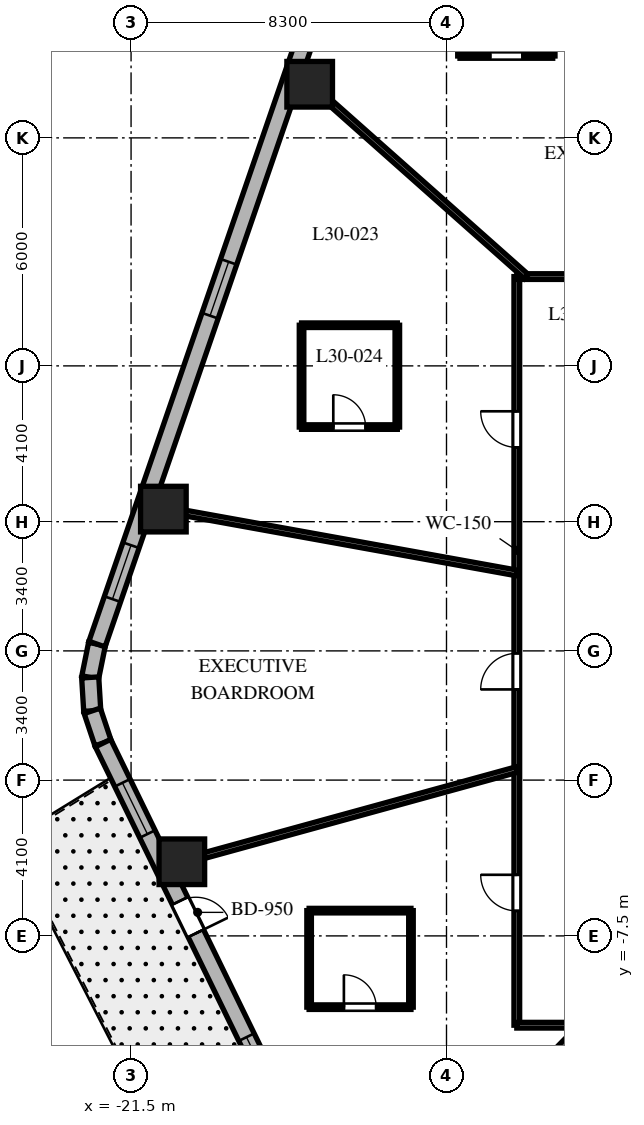
"""IFC4 building model, lengths in metres.
Left out: names, types, materials, properties, quantities, classifications, styles, units other than length and angle.
Written with IfcOpenShell. Run it as: python <this file> out.ifc"""

import sys

from ifc_helpers import new_model, si_unit, direction, frame, frame_2d, origin, origin_2d, place, context, subcontext, project, spatial, rectangle, extrude, element, fill, save


model = new_model("IFC4")
c1 = context("Model", 3, precision=1e-05, world=origin(), true_north=direction((0.0, 1.0)))
c2 = subcontext(c1, "Body", "Model", "MODEL_VIEW")
j1 = project(units=[si_unit("LENGTHUNIT", "METRE"), si_unit("PLANEANGLEUNIT", "RADIAN")], contexts=[c1])
p1 = place(None, origin())
s1 = spatial("IfcSite", under=j1, at=p1, CompositionType="ELEMENT")
p2 = place(p1, origin())
s2 = spatial("IfcBuilding", under=s1, at=p2, CompositionType="ELEMENT")
p3 = place(p2, frame((0.0, 0.0, 124.7)))
s3 = spatial("IfcBuildingStorey", under=s2, at=p3, CompositionType="ELEMENT", Elevation=124.7)
for number, where, z_axis, x_axis in (
    (1, (-16.8, 14.911, 0.0), (0.0, 0.0, 1.0), (1.0, 0.0, 0.0)),
    (2, (-20.65, 3.731, 0.0), (0.0, 0.0, 1.0), (1.0, 0.0, 0.0)),
    (3, (-20.164, -5.549, 0.0), (0.0, 0.0, 1.0), (1.0, 0.0, 0.0)),
):
    element("IfcColumn", number, at=place(p3, frame(where, z_axis=z_axis, x_axis=x_axis)), inside=s3, PredefinedType="COLUMN", context=c2, shape_type="SweptSolid", body=[
        extrude(rectangle(XDim=1.2, YDim=1.2, at=origin_2d()), origin(), (0.0, 0.0, 1.0), 3.7),
    ])
p4 = place(p3, frame((-22.397, 0.179, 0.0), z_axis=(0.0, 0.0, 1.0), x_axis=(-0.199313589404, -0.979935759669, 0.0)))
e4 = element("IfcWall", 4, at=p4, inside=s3, PredefinedType="SOLIDWALL", context=c2, shape_type="SweptSolid", body=[
    extrude(rectangle(XDim=0.896, YDim=0.45, at=frame_2d((0.448, 0.0))), origin(), (0.0, 0.0, 1.0), 3.4),
])
p5 = place(p3, frame((-22.575, -0.698, 0.0), z_axis=(0.0, 0.0, 1.0), x_axis=(0.060980441946, -0.998138961117, 0.0)))
e5 = element("IfcWall", 5, at=p5, inside=s3, PredefinedType="SOLIDWALL", context=c2, shape_type="SweptSolid", body=[
    extrude(rectangle(XDim=0.881, YDim=0.45, at=frame_2d((0.44, 0.0))), origin(), (0.0, 0.0, 1.0), 3.4),
])
p6 = place(p3, frame((-22.522, -1.577, 0.0), z_axis=(0.0, 0.0, 1.0), x_axis=(0.317372694837, -0.948300887151, 0.0)))
e6 = element("IfcWall", 6, at=p6, inside=s3, PredefinedType="SOLIDWALL", context=c2, shape_type="SweptSolid", body=[
    extrude(rectangle(XDim=0.896, YDim=0.45, at=frame_2d((0.448, 0.0))), origin(), (0.0, 0.0, 1.0), 3.4),
])
p7 = place(p3, frame((-15.992, 18.777, 0.0), z_axis=(0.0, 0.0, 1.0), x_axis=(-0.325606988926, -0.945505202927, 0.0)))
e7 = element("IfcWall", 7, at=p7, inside=s3, PredefinedType="SOLIDWALL", context=c2, shape_type="SweptSolid", body=[
    extrude(rectangle(XDim=19.669, YDim=0.45, at=frame_2d((9.835, 0.0))), origin(), (0.0, 0.0, 1.0), 3.4),
])
p8 = place(p7, frame((1.197, 0.0, 0.8)))
e8 = element("IfcOpeningElement", 8, at=p8, cuts=e7, PredefinedType="OPENING", context=c2, shape_type="SweptSolid", body=[
    extrude(rectangle(XDim=1.5, YDim=1.8, at=frame_2d((0.75, 0.9))), frame((0.0, 0.235, 0.0), z_axis=(0.0, -1.0, 0.0), x_axis=(1.0, 0.0, 0.0)), (0.0, 0.0, 1.0), 0.47),
])
p9 = place(p7, frame((9.03, 0.0, 0.8)))
e9 = element("IfcOpeningElement", 9, at=p9, cuts=e7, PredefinedType="OPENING", context=c2, shape_type="SweptSolid", body=[
    extrude(rectangle(XDim=1.5, YDim=1.8, at=frame_2d((0.75, 0.9))), frame((0.0, 0.235, 0.0), z_axis=(0.0, -1.0, 0.0), x_axis=(1.0, 0.0, 0.0)), (0.0, 0.0, 1.0), 0.47),
])
p10 = place(p7, frame((16.918, 0.0, 0.8)))
e10 = element("IfcOpeningElement", 10, at=p10, cuts=e7, PredefinedType="OPENING", context=c2, shape_type="SweptSolid", body=[
    extrude(rectangle(XDim=1.5, YDim=1.8, at=frame_2d((0.75, 0.9))), frame((0.0, 0.235, 0.0), z_axis=(0.0, -1.0, 0.0), x_axis=(1.0, 0.0, 0.0)), (0.0, 0.0, 1.0), 0.47),
])
p11 = place(p3, frame((-22.238, -2.427, 0.0), z_axis=(0.0, 0.0, 1.0), x_axis=(0.438374803278, -0.898792262901, 0.0)))
e11 = element("IfcWall", 11, at=p11, inside=s3, PredefinedType="SOLIDWALL", context=c2, shape_type="SweptSolid", body=[
    extrude(rectangle(XDim=18.618, YDim=0.45, at=frame_2d((9.309, 0.0))), origin(), (0.0, 0.0, 1.0), 3.4),
])
p12 = place(p11, frame((4.62, 0.0, 0.0)))
e12 = element("IfcOpeningElement", 12, at=p12, cuts=e11, PredefinedType="OPENING", context=c2, shape_type="SweptSolid", body=[
    extrude(rectangle(XDim=0.95, YDim=2.15, at=frame_2d((0.475, 1.075))), frame((0.0, 0.235, 0.0), z_axis=(0.0, -1.0, 0.0), x_axis=(1.0, 0.0, 0.0)), (0.0, 0.0, 1.0), 0.47),
])
p13 = place(p11, frame((1.163, 0.0, 0.8)))
e13 = element("IfcOpeningElement", 13, at=p13, cuts=e11, PredefinedType="OPENING", context=c2, shape_type="SweptSolid", body=[
    extrude(rectangle(XDim=1.5, YDim=1.8, at=frame_2d((0.75, 0.9))), frame((0.0, 0.235, 0.0), z_axis=(0.0, -1.0, 0.0), x_axis=(1.0, 0.0, 0.0)), (0.0, 0.0, 1.0), 0.47),
])
p14 = place(p11, frame((8.61, 0.0, 0.8)))
e14 = element("IfcOpeningElement", 14, at=p14, cuts=e11, PredefinedType="OPENING", context=c2, shape_type="SweptSolid", body=[
    extrude(rectangle(XDim=1.5, YDim=1.8, at=frame_2d((0.75, 0.9))), frame((0.0, 0.235, 0.0), z_axis=(0.0, -1.0, 0.0), x_axis=(1.0, 0.0, 0.0)), (0.0, 0.0, 1.0), 0.47),
])
p15 = place(p11, frame((16.006, 0.0, 0.8)))
e15 = element("IfcOpeningElement", 15, at=p15, cuts=e11, PredefinedType="OPENING", context=c2, shape_type="SweptSolid", body=[
    extrude(rectangle(XDim=1.5, YDim=1.8, at=frame_2d((0.75, 0.9))), frame((0.0, 0.235, 0.0), z_axis=(0.0, -1.0, 0.0), x_axis=(1.0, 0.0, 0.0)), (0.0, 0.0, 1.0), 0.47),
])
p16 = place(p3, frame((-11.35, -9.85, 0.0), z_axis=(0.0, 0.0, 1.0), x_axis=(0.0, 1.0, 0.0)))
e16 = element("IfcWall", 16, at=p16, inside=s3, PredefinedType="PARTITIONING", context=c2, shape_type="SweptSolid", body=[
    extrude(rectangle(XDim=19.7, YDim=0.15, at=frame_2d((9.85, 0.0))), origin(), (0.0, 0.0, 1.0), 2.84),
])
p17 = place(p16, frame((15.205, 0.0, 0.0)))
e17 = element("IfcOpeningElement", 17, at=p17, cuts=e16, PredefinedType="OPENING", context=c2, shape_type="SweptSolid", body=[
    extrude(rectangle(XDim=0.95, YDim=2.03, at=frame_2d((0.475, 1.015))), frame((0.0, 0.085, 0.0), z_axis=(0.0, -1.0, 0.0), x_axis=(1.0, 0.0, 0.0)), (0.0, 0.0, 1.0), 0.17),
])
p18 = place(p16, frame((8.836, 0.0, 0.0)))
e18 = element("IfcOpeningElement", 18, at=p18, cuts=e16, PredefinedType="OPENING", context=c2, shape_type="SweptSolid", body=[
    extrude(rectangle(XDim=0.95, YDim=2.03, at=frame_2d((0.475, 1.015))), frame((0.0, 0.085, 0.0), z_axis=(0.0, -1.0, 0.0), x_axis=(1.0, 0.0, 0.0)), (0.0, 0.0, 1.0), 0.17),
])
p19 = place(p16, frame((3.008, 0.0, 0.0)))
e19 = element("IfcOpeningElement", 19, at=p19, cuts=e16, PredefinedType="OPENING", context=c2, shape_type="SweptSolid", body=[
    extrude(rectangle(XDim=0.95, YDim=2.03, at=frame_2d((0.475, 1.015))), frame((0.0, 0.085, 0.0), z_axis=(0.0, -1.0, 0.0), x_axis=(1.0, 0.0, 0.0)), (0.0, 0.0, 1.0), 0.17),
])
p20 = place(p3, frame((-11.35, 9.85, 0.0), z_axis=(0.0, 0.0, 1.0), x_axis=(1.0, 0.0, 0.0)))
e20 = element("IfcWall", 20, at=p20, inside=s3, PredefinedType="PARTITIONING", context=c2, shape_type="SweptSolid", body=[
    extrude(rectangle(XDim=22.7, YDim=0.15, at=frame_2d((11.35, 0.0))), origin(), (0.0, 0.0, 1.0), 2.84),
])
p21 = place(p20, frame((17.237, 0.0, 0.0)))
e21 = element("IfcOpeningElement", 21, at=p21, cuts=e20, PredefinedType="OPENING", context=c2, shape_type="SweptSolid", body=[
    extrude(rectangle(XDim=0.95, YDim=2.03, at=frame_2d((0.475, 1.015))), frame((0.0, 0.085, 0.0), z_axis=(0.0, -1.0, 0.0), x_axis=(1.0, 0.0, 0.0)), (0.0, 0.0, 1.0), 0.17),
])
p22 = place(p20, frame((11.994, 0.0, 0.0)))
e22 = element("IfcOpeningElement", 22, at=p22, cuts=e20, PredefinedType="OPENING", context=c2, shape_type="SweptSolid", body=[
    extrude(rectangle(XDim=0.95, YDim=2.03, at=frame_2d((0.475, 1.015))), frame((0.0, 0.085, 0.0), z_axis=(0.0, -1.0, 0.0), x_axis=(1.0, 0.0, 0.0)), (0.0, 0.0, 1.0), 0.17),
])
p23 = place(p20, frame((8.559, 0.0, 0.0)))
e23 = element("IfcOpeningElement", 23, at=p23, cuts=e20, PredefinedType="OPENING", context=c2, shape_type="SweptSolid", body=[
    extrude(rectangle(XDim=0.95, YDim=2.03, at=frame_2d((0.475, 1.015))), frame((0.0, 0.085, 0.0), z_axis=(0.0, -1.0, 0.0), x_axis=(1.0, 0.0, 0.0)), (0.0, 0.0, 1.0), 0.17),
])
p24 = place(p20, frame((3.399, 0.0, 0.0)))
e24 = element("IfcOpeningElement", 24, at=p24, cuts=e20, PredefinedType="OPENING", context=c2, shape_type="SweptSolid", body=[
    extrude(rectangle(XDim=0.95, YDim=2.03, at=frame_2d((0.475, 1.015))), frame((0.0, 0.085, 0.0), z_axis=(0.0, -1.0, 0.0), x_axis=(1.0, 0.0, 0.0)), (0.0, 0.0, 1.0), 0.17),
])
p25 = place(p3, frame((11.35, -9.85, 0.0), z_axis=(0.0, 0.0, 1.0), x_axis=(-1.0, 0.0, 0.0)))
e25 = element("IfcWall", 25, at=p25, inside=s3, PredefinedType="PARTITIONING", context=c2, shape_type="SweptSolid", body=[
    extrude(rectangle(XDim=22.7, YDim=0.15, at=frame_2d((11.35, 0.0))), origin(), (0.0, 0.0, 1.0), 2.84),
])
p26 = place(p25, frame((17.237, 0.0, 0.0)))
e26 = element("IfcOpeningElement", 26, at=p26, cuts=e25, PredefinedType="OPENING", context=c2, shape_type="SweptSolid", body=[
    extrude(rectangle(XDim=0.95, YDim=2.03, at=frame_2d((0.475, 1.015))), frame((0.0, 0.085, 0.0), z_axis=(0.0, -1.0, 0.0), x_axis=(1.0, 0.0, 0.0)), (0.0, 0.0, 1.0), 0.17),
])
p27 = place(p25, frame((10.45, 0.0, 0.0)))
e27 = element("IfcOpeningElement", 27, at=p27, cuts=e25, PredefinedType="OPENING", context=c2, shape_type="SweptSolid", body=[
    extrude(rectangle(XDim=0.95, YDim=2.03, at=frame_2d((0.475, 1.015))), frame((0.0, 0.085, 0.0), z_axis=(0.0, -1.0, 0.0), x_axis=(1.0, 0.0, 0.0)), (0.0, 0.0, 1.0), 0.17),
])
p28 = place(p25, frame((3.399, 0.0, 0.0)))
e28 = element("IfcOpeningElement", 28, at=p28, cuts=e25, PredefinedType="OPENING", context=c2, shape_type="SweptSolid", body=[
    extrude(rectangle(XDim=0.95, YDim=2.03, at=frame_2d((0.475, 1.015))), frame((0.0, 0.085, 0.0), z_axis=(0.0, -1.0, 0.0), x_axis=(1.0, 0.0, 0.0)), (0.0, 0.0, 1.0), 0.17),
])
p29 = place(p3, frame((-11.098, 9.85, 0.0), z_axis=(0.0, 0.0, 1.0), x_axis=(-0.747904295103, 0.663806572253, 0.0)))
e29 = element("IfcWall", 29, at=p29, inside=s3, PredefinedType="PARTITIONING", context=c2, shape_type="SweptSolid", body=[
    extrude(rectangle(XDim=8.16, YDim=0.15, at=frame_2d((4.08, 0.0))), origin(), (0.0, 0.0, 1.0), 2.54),
])
p30 = place(p3, frame((-11.35, 2.051, 0.0), z_axis=(0.0, 0.0, 1.0), x_axis=(-0.984068313063, 0.177790762484, 0.0)))
e30 = element("IfcWall", 30, at=p30, inside=s3, PredefinedType="PARTITIONING", context=c2, shape_type="SweptSolid", body=[
    extrude(rectangle(XDim=9.951, YDim=0.15, at=frame_2d((4.976, 0.0))), origin(), (0.0, 0.0, 1.0), 2.54),
])
p31 = place(p3, frame((-11.35, -3.123, 0.0), z_axis=(0.0, 0.0, 1.0), x_axis=(-0.964151983214, -0.265350623261, 0.0)))
e31 = element("IfcWall", 31, at=p31, inside=s3, PredefinedType="PARTITIONING", context=c2, shape_type="SweptSolid", body=[
    extrude(rectangle(XDim=9.645, YDim=0.15, at=frame_2d((4.823, 0.0))), origin(), (0.0, 0.0, 1.0), 2.54),
])
p32 = place(p3, frame((-9.628, -9.85, 0.0), z_axis=(0.0, 0.0, 1.0), x_axis=(-0.698992824326, -0.715128681805, 0.0)))
e32 = element("IfcWall", 32, at=p32, inside=s3, PredefinedType="PARTITIONING", context=c2, shape_type="SweptSolid", body=[
    extrude(rectangle(XDim=8.579, YDim=0.15, at=frame_2d((4.29, 0.0))), origin(), (0.0, 0.0, 1.0), 2.54),
])
p33 = place(p3, frame((-12.845, 15.655, 0.0), z_axis=(0.0, 0.0, 1.0), x_axis=(1.0, 0.0, 0.0)))
e33 = element("IfcWall", 33, at=p33, inside=s3, PredefinedType="PARTITIONING", context=c2, shape_type="SweptSolid", body=[
    extrude(rectangle(XDim=2.44, YDim=0.12, at=frame_2d((1.22, 0.0))), origin(), (0.0, 0.0, 1.0), 3.4),
])
p34 = place(p33, frame((0.795, 0.0, 0.0)))
e34 = element("IfcOpeningElement", 34, at=p34, cuts=e33, PredefinedType="OPENING", context=c2, shape_type="SweptSolid", body=[
    extrude(rectangle(XDim=0.85, YDim=2.03, at=frame_2d((0.425, 1.015))), frame((0.0, 0.07, 0.0), z_axis=(0.0, -1.0, 0.0), x_axis=(1.0, 0.0, 0.0)), (0.0, 0.0, 1.0), 0.14),
])
p35 = place(p3, frame((-10.405, 15.655, 0.0), z_axis=(0.0, 0.0, 1.0), x_axis=(0.0, 1.0, 0.0)))
e35 = element("IfcWall", 35, at=p35, inside=s3, PredefinedType="PARTITIONING", context=c2, shape_type="SweptSolid", body=[
    extrude(rectangle(XDim=2.61, YDim=0.12, at=frame_2d((1.305, 0.0))), origin(), (0.0, 0.0, 1.0), 3.4),
])
p36 = place(p3, frame((-12.845, 18.265, 0.0), z_axis=(0.0, 0.0, 1.0), x_axis=(0.0, -1.0, 0.0)))
e36 = element("IfcWall", 36, at=p36, inside=s3, PredefinedType="PARTITIONING", context=c2, shape_type="SweptSolid", body=[
    extrude(rectangle(XDim=2.61, YDim=0.12, at=frame_2d((1.305, 0.0))), origin(), (0.0, 0.0, 1.0), 2.54),
])
p37 = place(p3, frame((-17.014, 5.89, 0.0), z_axis=(0.0, 0.0, 1.0), x_axis=(1.0, 0.0, 0.0)))
e37 = element("IfcWall", 37, at=p37, inside=s3, PredefinedType="PARTITIONING", context=c2, shape_type="SweptSolid", body=[
    extrude(rectangle(XDim=2.52, YDim=0.12, at=frame_2d((1.26, 0.0))), origin(), (0.0, 0.0, 1.0), 2.84),
])
p38 = place(p37, frame((0.835, 0.0, 0.0)))
e38 = element("IfcOpeningElement", 38, at=p38, cuts=e37, PredefinedType="OPENING", context=c2, shape_type="SweptSolid", body=[
    extrude(rectangle(XDim=0.85, YDim=2.03, at=frame_2d((0.425, 1.015))), frame((0.0, 0.07, 0.0), z_axis=(0.0, -1.0, 0.0), x_axis=(1.0, 0.0, 0.0)), (0.0, 0.0, 1.0), 0.14),
])
p39 = place(p3, frame((-14.494, 5.89, 0.0), z_axis=(0.0, 0.0, 1.0), x_axis=(0.0, 1.0, 0.0)))
e39 = element("IfcWall", 39, at=p39, inside=s3, PredefinedType="PARTITIONING", context=c2, shape_type="SweptSolid", body=[
    extrude(rectangle(XDim=2.68, YDim=0.12, at=frame_2d((1.34, 0.0))), origin(), (0.0, 0.0, 1.0), 3.4),
])
p40 = place(p3, frame((-14.494, 8.57, 0.0), z_axis=(0.0, 0.0, 1.0), x_axis=(-1.0, 0.0, 0.0)))
e40 = element("IfcWall", 40, at=p40, inside=s3, PredefinedType="PARTITIONING", context=c2, shape_type="SweptSolid", body=[
    extrude(rectangle(XDim=2.52, YDim=0.12, at=frame_2d((1.26, 0.0))), origin(), (0.0, 0.0, 1.0), 2.972),
])
p41 = place(p3, frame((-17.014, 8.57, 0.0), z_axis=(0.0, 0.0, 1.0), x_axis=(0.0, -1.0, 0.0)))
e41 = element("IfcWall", 41, at=p41, inside=s3, PredefinedType="PARTITIONING", context=c2, shape_type="SweptSolid", body=[
    extrude(rectangle(XDim=2.68, YDim=0.12, at=frame_2d((1.34, 0.0))), origin(), (0.0, 0.0, 1.0), 3.4),
])
p42 = place(p3, frame((-16.815, -9.375, 0.0), z_axis=(0.0, 0.0, 1.0), x_axis=(1.0, 0.0, 0.0)))
e42 = element("IfcWall", 42, at=p42, inside=s3, PredefinedType="PARTITIONING", context=c2, shape_type="SweptSolid", body=[
    extrude(rectangle(XDim=2.68, YDim=0.12, at=frame_2d((1.34, 0.0))), origin(), (0.0, 0.0, 1.0), 2.927),
])
p43 = place(p42, frame((0.915, 0.0, 0.0)))
e43 = element("IfcOpeningElement", 43, at=p43, cuts=e42, PredefinedType="OPENING", context=c2, shape_type="SweptSolid", body=[
    extrude(rectangle(XDim=0.85, YDim=2.03, at=frame_2d((0.425, 1.015))), frame((0.0, 0.07, 0.0), z_axis=(0.0, -1.0, 0.0), x_axis=(1.0, 0.0, 0.0)), (0.0, 0.0, 1.0), 0.14),
])
p44 = place(p3, frame((-14.135, -9.375, 0.0), z_axis=(0.0, 0.0, 1.0), x_axis=(0.0, 1.0, 0.0)))
e44 = element("IfcWall", 44, at=p44, inside=s3, PredefinedType="PARTITIONING", context=c2, shape_type="SweptSolid", body=[
    extrude(rectangle(XDim=2.54, YDim=0.12, at=frame_2d((1.27, 0.0))), origin(), (0.0, 0.0, 1.0), 3.4),
])
p45 = place(p3, frame((-14.135, -6.835, 0.0), z_axis=(0.0, 0.0, 1.0), x_axis=(-1.0, 0.0, 0.0)))
e45 = element("IfcWall", 45, at=p45, inside=s3, PredefinedType="PARTITIONING", context=c2, shape_type="SweptSolid", body=[
    extrude(rectangle(XDim=2.68, YDim=0.12, at=frame_2d((1.34, 0.0))), origin(), (0.0, 0.0, 1.0), 2.927),
])
p46 = place(p3, frame((-16.815, -6.835, 0.0), z_axis=(0.0, 0.0, 1.0), x_axis=(0.0, -1.0, 0.0)))
e46 = element("IfcWall", 46, at=p46, inside=s3, PredefinedType="PARTITIONING", context=c2, shape_type="SweptSolid", body=[
    extrude(rectangle(XDim=2.54, YDim=0.12, at=frame_2d((1.27, 0.0))), origin(), (0.0, 0.0, 1.0), 3.4),
])
p47 = place(p9, origin())
e47 = element("IfcWindow", 47, at=p47, inside=s3, PartitioningType="SINGLE_PANEL", PredefinedType="WINDOW", context=c2, shape_type="SweptSolid", body=[
    extrude(rectangle(XDim=1.5, YDim=1.8, at=frame_2d((0.75, 0.9))), frame((0.0, 0.03, 0.0), z_axis=(0.0, -1.0, 0.0), x_axis=(1.0, 0.0, 0.0)), (0.0, 0.0, 1.0), 0.06),
])
fill(e9, e47)
p48 = place(p10, origin())
e48 = element("IfcWindow", 48, at=p48, inside=s3, PartitioningType="SINGLE_PANEL", PredefinedType="WINDOW", context=c2, shape_type="SweptSolid", body=[
    extrude(rectangle(XDim=1.5, YDim=1.8, at=frame_2d((0.75, 0.9))), frame((0.0, 0.03, 0.0), z_axis=(0.0, -1.0, 0.0), x_axis=(1.0, 0.0, 0.0)), (0.0, 0.0, 1.0), 0.06),
])
fill(e10, e48)
p49 = place(p12, origin())
e49 = element("IfcDoor", 49, at=p49, inside=s3, OperationType="SINGLE_SWING_RIGHT", PredefinedType="DOOR", context=c2, shape_type="SweptSolid", body=[
    extrude(rectangle(XDim=0.95, YDim=2.15, at=frame_2d((0.475, 1.075))), frame((0.0, 0.025, 0.0), z_axis=(0.0, -1.0, 0.0), x_axis=(1.0, 0.0, 0.0)), (0.0, 0.0, 1.0), 0.05),
])
fill(e12, e49)
p50 = place(p13, origin())
e50 = element("IfcWindow", 50, at=p50, inside=s3, PartitioningType="SINGLE_PANEL", PredefinedType="WINDOW", context=c2, shape_type="SweptSolid", body=[
    extrude(rectangle(XDim=1.5, YDim=1.8, at=frame_2d((0.75, 0.9))), frame((0.0, 0.03, 0.0), z_axis=(0.0, -1.0, 0.0), x_axis=(1.0, 0.0, 0.0)), (0.0, 0.0, 1.0), 0.06),
])
fill(e13, e50)
p51 = place(p14, origin())
e51 = element("IfcWindow", 51, at=p51, inside=s3, PartitioningType="SINGLE_PANEL", PredefinedType="WINDOW", context=c2, shape_type="SweptSolid", body=[
    extrude(rectangle(XDim=1.5, YDim=1.8, at=frame_2d((0.75, 0.9))), frame((0.0, 0.03, 0.0), z_axis=(0.0, -1.0, 0.0), x_axis=(1.0, 0.0, 0.0)), (0.0, 0.0, 1.0), 0.06),
])
fill(e14, e51)
p52 = place(p34, origin())
e52 = element("IfcDoor", 52, at=p52, inside=s3, OperationType="SINGLE_SWING_RIGHT", PredefinedType="DOOR", context=c2, shape_type="SweptSolid", body=[
    extrude(rectangle(XDim=0.85, YDim=2.03, at=frame_2d((0.425, 1.015))), frame((0.0, 0.025, 0.0), z_axis=(0.0, -1.0, 0.0), x_axis=(1.0, 0.0, 0.0)), (0.0, 0.0, 1.0), 0.05),
])
fill(e34, e52)
p53 = place(p17, origin())
e53 = element("IfcDoor", 53, at=p53, inside=s3, OperationType="SINGLE_SWING_RIGHT", PredefinedType="DOOR", context=c2, shape_type="SweptSolid", body=[
    extrude(rectangle(XDim=0.95, YDim=2.03, at=frame_2d((0.475, 1.015))), frame((0.0, 0.025, 0.0), z_axis=(0.0, -1.0, 0.0), x_axis=(1.0, 0.0, 0.0)), (0.0, 0.0, 1.0), 0.05),
])
fill(e17, e53)
p54 = place(p38, origin())
e54 = element("IfcDoor", 54, at=p54, inside=s3, OperationType="SINGLE_SWING_LEFT", PredefinedType="DOOR", context=c2, shape_type="SweptSolid", body=[
    extrude(rectangle(XDim=0.85, YDim=2.03, at=frame_2d((0.425, 1.015))), frame((0.0, 0.025, 0.0), z_axis=(0.0, -1.0, 0.0), x_axis=(1.0, 0.0, 0.0)), (0.0, 0.0, 1.0), 0.05),
])
fill(e38, e54)
p55 = place(p18, origin())
e55 = element("IfcDoor", 55, at=p55, inside=s3, OperationType="SINGLE_SWING_LEFT", PredefinedType="DOOR", context=c2, shape_type="SweptSolid", body=[
    extrude(rectangle(XDim=0.95, YDim=2.03, at=frame_2d((0.475, 1.015))), frame((0.0, 0.025, 0.0), z_axis=(0.0, -1.0, 0.0), x_axis=(1.0, 0.0, 0.0)), (0.0, 0.0, 1.0), 0.05),
])
fill(e18, e55)
p56 = place(p19, origin())
e56 = element("IfcDoor", 56, at=p56, inside=s3, OperationType="SINGLE_SWING_RIGHT", PredefinedType="DOOR", context=c2, shape_type="SweptSolid", body=[
    extrude(rectangle(XDim=0.95, YDim=2.03, at=frame_2d((0.475, 1.015))), frame((0.0, 0.025, 0.0), z_axis=(0.0, -1.0, 0.0), x_axis=(1.0, 0.0, 0.0)), (0.0, 0.0, 1.0), 0.05),
])
fill(e19, e56)
p57 = place(p43, origin())
e57 = element("IfcDoor", 57, at=p57, inside=s3, OperationType="SINGLE_SWING_LEFT", PredefinedType="DOOR", context=c2, shape_type="SweptSolid", body=[
    extrude(rectangle(XDim=0.85, YDim=2.03, at=frame_2d((0.425, 1.015))), frame((0.0, 0.025, 0.0), z_axis=(0.0, -1.0, 0.0), x_axis=(1.0, 0.0, 0.0)), (0.0, 0.0, 1.0), 0.05),
])
fill(e43, e57)
save(model, sys.argv[1])
